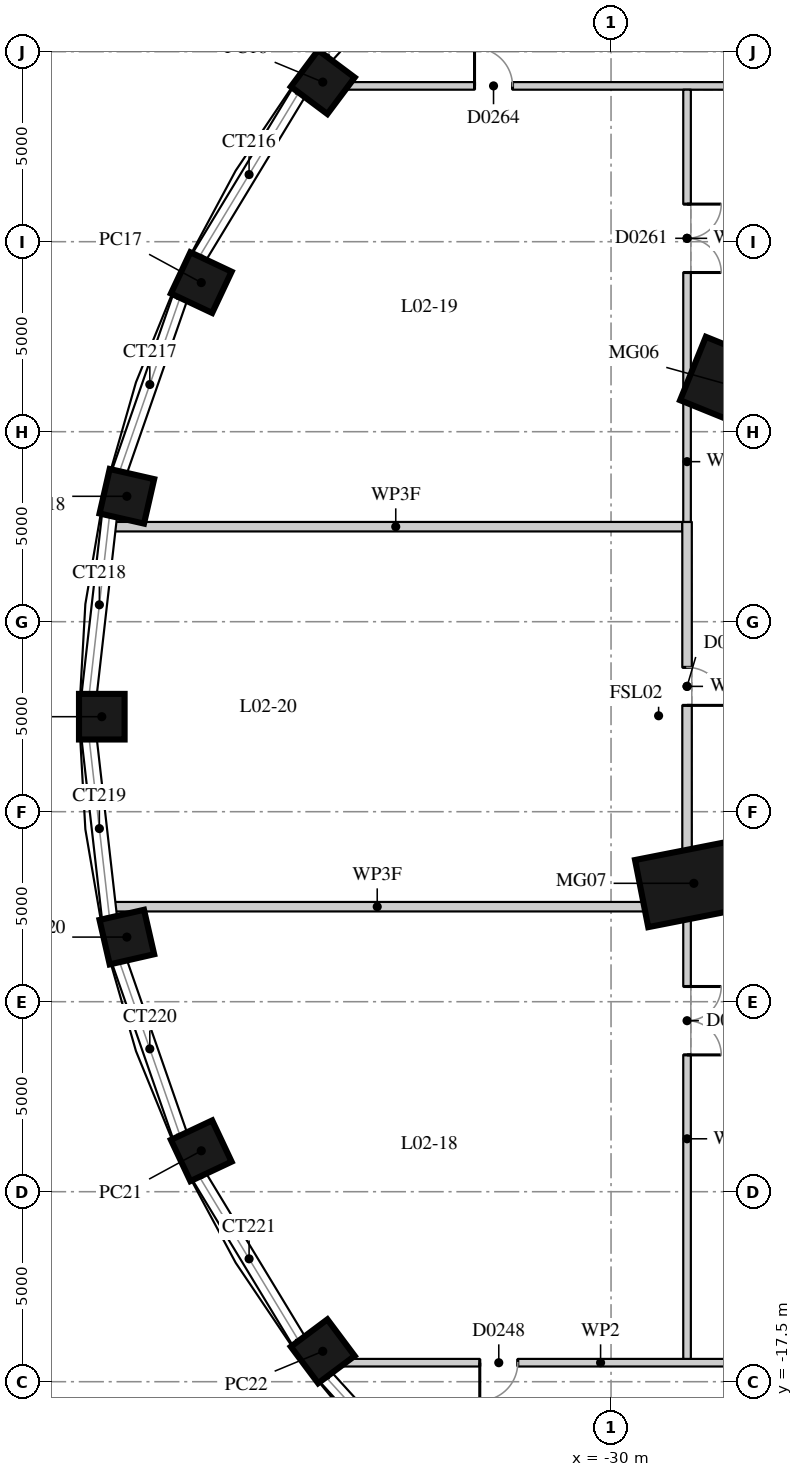
"""IFC4 building model, lengths in metres.
Left out: names, types, materials, properties, quantities, classifications, styles, units other than length and angle.
Written with IfcOpenShell. Run it as: python <this file> out.ifc"""

import sys

from ifc_helpers import new_model, si_unit, direction, frame, frame_2d, origin, origin_2d, place, context, subcontext, project, spatial, rectangle, extrude, element, fill, save


model = new_model("IFC4")
c1 = context("Model", 3, precision=1e-05, world=origin(), true_north=direction((0.0, 1.0)))
c2 = subcontext(c1, "Body", "Model", "MODEL_VIEW")
j1 = project(units=[si_unit("LENGTHUNIT", "METRE"), si_unit("PLANEANGLEUNIT", "RADIAN")], contexts=[c1])
p1 = place(None, origin())
s1 = spatial("IfcSite", under=j1, at=p1, CompositionType="ELEMENT")
p2 = place(p1, origin())
s2 = spatial("IfcBuilding", under=s1, at=p2, CompositionType="ELEMENT")
p3 = place(p2, frame((0.0, 0.0, 12.5)))
s3 = spatial("IfcBuildingStorey", under=s2, at=p3, CompositionType="ELEMENT", Elevation=12.5)
for number, where, z_axis, x_axis in (
    (1, (-26.546, 8.636, 0.0), (0.0, 0.0, 1.0), (-0.927, 0.376, 0.0)),
    (2, (-27.821, -4.385, 0.0), (0.0, 0.0, 1.0), (-0.981, -0.193, 0.0)),
):
    element("IfcColumn", number, at=place(p3, frame(where, z_axis=z_axis, x_axis=x_axis)), inside=s3, PredefinedType="COLUMN", context=c2, shape_type="SweptSolid", body=[
        extrude(rectangle(XDim=2.8, YDim=1.8, at=origin_2d()), origin(), (0.0, 0.0, 1.0), 5.0),
    ])
for number, where, z_axis, x_axis in (
    (3, (-37.585, 16.7, 0.0), (0.0, 0.0, 1.0), (-0.801, 0.599, 0.0)),
    (4, (-40.783, 11.424, 0.0), (0.0, 0.0, 1.0), (-0.905, 0.426, 0.0)),
    (5, (-42.741, 5.8, 0.0), (0.0, 0.0, 1.0), (-0.975, 0.222, 0.0)),
    (6, (-43.4, 0.0, 0.0), (0.0, 0.0, 1.0), (-1.0, 0.0, 0.0)),
    (7, (-42.741, -5.8, 0.0), (0.0, 0.0, 1.0), (-0.975, -0.222, 0.0)),
    (8, (-40.783, -11.424, 0.0), (0.0, 0.0, 1.0), (-0.905, -0.426, 0.0)),
    (9, (-37.585, -16.7, 0.0), (0.0, 0.0, 1.0), (-0.801, -0.599, 0.0)),
):
    element("IfcColumn", number, at=place(p3, frame(where, z_axis=z_axis, x_axis=x_axis)), inside=s3, PredefinedType="COLUMN", context=c2, shape_type="SweptSolid", body=[
        extrude(rectangle(XDim=1.2, YDim=1.2, at=origin_2d()), origin(), (0.0, 0.0, 1.0), 5.0),
    ])
p4 = place(p3, frame((-37.808, -17.0, 0.0), z_axis=(0.0, 0.0, 1.0), x_axis=(1.0, 0.0, 0.0)))
e10 = element("IfcWall", 10, at=p4, inside=s3, PredefinedType="PARTITIONING", context=c2, shape_type="SweptSolid", body=[
    extrude(rectangle(XDim=15.067, YDim=0.2, at=frame_2d((7.533, 0.0))), origin(), (0.0, 0.0, 1.0), 4.65),
])
p5 = place(p4, frame((4.354, 0.0, 0.0)))
e11 = element("IfcOpeningElement", 11, at=p5, cuts=e10, PredefinedType="OPENING", context=c2, shape_type="SweptSolid", body=[
    extrude(rectangle(XDim=1.0, YDim=2.1, at=frame_2d((0.5, 1.05))), frame((0.0, 0.11, 0.0), z_axis=(0.0, -1.0, 0.0), x_axis=(1.0, 0.0, 0.0)), (0.0, 0.0, 1.0), 0.22),
])
p6 = place(p4, frame((13.417, 0.0, 0.0)))
e12 = element("IfcOpeningElement", 12, at=p6, cuts=e10, PredefinedType="OPENING", context=c2, shape_type="SweptSolid", body=[
    extrude(rectangle(XDim=1.0, YDim=2.1, at=frame_2d((0.5, 1.05))), frame((0.0, 0.11, 0.0), z_axis=(0.0, -1.0, 0.0), x_axis=(1.0, 0.0, 0.0)), (0.0, 0.0, 1.0), 0.22),
])
p7 = place(p3, frame((-43.205, -5.0, 0.0), z_axis=(0.0, 0.0, 1.0), x_axis=(1.0, 0.0, 0.0)))
e13 = element("IfcWall", 13, at=p7, inside=s3, PredefinedType="PARTITIONING", context=c2, shape_type="SweptSolid", body=[
    extrude(rectangle(XDim=14.105, YDim=0.25, at=frame_2d((7.052, 0.0))), origin(), (0.0, 0.0, 1.0), 3.65),
])
p8 = place(p3, frame((-43.205, 5.0, 0.0), z_axis=(0.0, 0.0, 1.0), x_axis=(1.0, 0.0, 0.0)))
e14 = element("IfcWall", 14, at=p8, inside=s3, PredefinedType="PARTITIONING", context=c2, shape_type="SweptSolid", body=[
    extrude(rectangle(XDim=15.08, YDim=0.25, at=frame_2d((7.54, 0.0))), origin(), (0.0, 0.0, 1.0), 3.65),
])
p9 = place(p3, frame((-38.084, 16.6, 0.0), z_axis=(0.0, 0.0, 1.0), x_axis=(1.0, 0.0, 0.0)))
e15 = element("IfcWall", 15, at=p9, inside=s3, PredefinedType="PARTITIONING", context=c2, shape_type="SweptSolid", body=[
    extrude(rectangle(XDim=23.685, YDim=0.2, at=frame_2d((11.842, 0.0))), origin(), (0.0, 0.0, 1.0), 4.65),
])
p10 = place(p9, frame((4.492, 0.0, 0.0)))
e16 = element("IfcOpeningElement", 16, at=p10, cuts=e15, PredefinedType="OPENING", context=c2, shape_type="SweptSolid", body=[
    extrude(rectangle(XDim=1.0, YDim=2.1, at=frame_2d((0.5, 1.05))), frame((0.0, 0.11, 0.0), z_axis=(0.0, -1.0, 0.0), x_axis=(1.0, 0.0, 0.0)), (0.0, 0.0, 1.0), 0.22),
])
p11 = place(p9, frame((15.584, 0.0, 0.0)))
e17 = element("IfcOpeningElement", 17, at=p11, cuts=e15, PredefinedType="OPENING", context=c2, shape_type="SweptSolid", body=[
    extrude(rectangle(XDim=1.0, YDim=2.1, at=frame_2d((0.5, 1.05))), frame((0.0, 0.11, 0.0), z_axis=(0.0, -1.0, 0.0), x_axis=(1.0, 0.0, 0.0)), (0.0, 0.0, 1.0), 0.22),
])
p12 = place(p3, frame((-28.0, -16.9, 0.0), z_axis=(0.0, 0.0, 1.0), x_axis=(0.0, 1.0, 0.0)))
e18 = element("IfcWall", 18, at=p12, inside=s3, PredefinedType="PARTITIONING", context=c2, shape_type="SweptSolid", body=[
    extrude(rectangle(XDim=11.584, YDim=0.2, at=frame_2d((5.792, 0.0))), origin(), (0.0, 0.0, 1.0), 4.65),
])
p13 = place(p12, frame((8.0, 0.0, 0.0)))
e19 = element("IfcOpeningElement", 19, at=p13, cuts=e18, PredefinedType="OPENING", context=c2, shape_type="SweptSolid", body=[
    extrude(rectangle(XDim=1.8, YDim=2.1, at=frame_2d((0.9, 1.05))), frame((0.0, 0.11, 0.0), z_axis=(0.0, -1.0, 0.0), x_axis=(1.0, 0.0, 0.0)), (0.0, 0.0, 1.0), 0.22),
])
p14 = place(p3, frame((-28.0, -3.529, 0.0), z_axis=(0.0, 0.0, 1.0), x_axis=(0.0, 1.0, 0.0)))
e20 = element("IfcWall", 20, at=p14, inside=s3, PredefinedType="PARTITIONING", context=c2, shape_type="SweptSolid", body=[
    extrude(rectangle(XDim=8.654, YDim=0.25, at=frame_2d((4.327, 0.0))), origin(), (0.0, 0.0, 1.0), 2.65),
])
p15 = place(p14, frame((3.827, 0.0, 0.0)))
e21 = element("IfcOpeningElement", 21, at=p15, cuts=e20, PredefinedType="OPENING", context=c2, shape_type="SweptSolid", body=[
    extrude(rectangle(XDim=1.0, YDim=2.1, at=frame_2d((0.5, 1.05))), frame((0.0, 0.135, 0.0), z_axis=(0.0, -1.0, 0.0), x_axis=(1.0, 0.0, 0.0)), (0.0, 0.0, 1.0), 0.27),
])
p16 = place(p3, frame((-28.0, 5.125, 0.0), z_axis=(0.0, 0.0, 1.0), x_axis=(0.0, 1.0, 0.0)))
e22 = element("IfcWall", 22, at=p16, inside=s3, PredefinedType="PARTITIONING", context=c2, shape_type="SweptSolid", body=[
    extrude(rectangle(XDim=3.173, YDim=0.2, at=frame_2d((1.586, 0.0))), origin(), (0.0, 0.0, 1.0), 2.65),
])
p17 = place(p3, frame((-28.0, 8.677, 0.0), z_axis=(0.0, 0.0, 1.0), x_axis=(0.0, 1.0, 0.0)))
e23 = element("IfcWall", 23, at=p17, inside=s3, PredefinedType="PARTITIONING", context=c2, shape_type="SweptSolid", body=[
    extrude(rectangle(XDim=7.823, YDim=0.2, at=frame_2d((3.912, 0.0))), origin(), (0.0, 0.0, 1.0), 4.65),
])
p18 = place(p17, frame((3.012, 0.0, 0.0)))
e24 = element("IfcOpeningElement", 24, at=p18, cuts=e23, PredefinedType="OPENING", context=c2, shape_type="SweptSolid", body=[
    extrude(rectangle(XDim=1.8, YDim=2.1, at=frame_2d((0.9, 1.05))), frame((0.0, 0.11, 0.0), z_axis=(0.0, -1.0, 0.0), x_axis=(1.0, 0.0, 0.0)), (0.0, 0.0, 1.0), 0.22),
])
p19 = place(p13, origin())
e25 = element("IfcDoor", 25, at=p19, inside=s3, OperationType="DOUBLE_DOOR_SINGLE_SWING", PredefinedType="DOOR", context=c2, shape_type="SweptSolid", body=[
    extrude(rectangle(XDim=1.8, YDim=2.1, at=frame_2d((0.9, 1.05))), frame((0.0, 0.025, 0.0), z_axis=(0.0, -1.0, 0.0), x_axis=(1.0, 0.0, 0.0)), (0.0, 0.0, 1.0), 0.05),
])
fill(e19, e25)
p20 = place(p5, origin())
e26 = element("IfcDoor", 26, at=p20, inside=s3, OperationType="SINGLE_SWING_RIGHT", PredefinedType="DOOR", context=c2, shape_type="SweptSolid", body=[
    extrude(rectangle(XDim=1.0, YDim=2.1, at=frame_2d((0.5, 1.05))), frame((0.0, 0.025, 0.0), z_axis=(0.0, -1.0, 0.0), x_axis=(1.0, 0.0, 0.0)), (0.0, 0.0, 1.0), 0.05),
])
fill(e11, e26)
p21 = place(p18, origin())
e27 = element("IfcDoor", 27, at=p21, inside=s3, OperationType="DOUBLE_DOOR_SINGLE_SWING", PredefinedType="DOOR", context=c2, shape_type="SweptSolid", body=[
    extrude(rectangle(XDim=1.8, YDim=2.1, at=frame_2d((0.9, 1.05))), frame((0.0, 0.025, 0.0), z_axis=(0.0, -1.0, 0.0), x_axis=(1.0, 0.0, 0.0)), (0.0, 0.0, 1.0), 0.05),
])
fill(e24, e27)
p22 = place(p15, origin())
e28 = element("IfcDoor", 28, at=p22, inside=s3, OperationType="SINGLE_SWING_RIGHT", PredefinedType="DOOR", context=c2, shape_type="SweptSolid", body=[
    extrude(rectangle(XDim=1.0, YDim=2.1, at=frame_2d((0.5, 1.05))), frame((0.0, 0.025, 0.0), z_axis=(0.0, -1.0, 0.0), x_axis=(1.0, 0.0, 0.0)), (0.0, 0.0, 1.0), 0.05),
])
fill(e21, e28)
p23 = place(p10, origin())
e29 = element("IfcDoor", 29, at=p23, inside=s3, OperationType="SINGLE_SWING_LEFT", PredefinedType="DOOR", context=c2, shape_type="SweptSolid", body=[
    extrude(rectangle(XDim=1.0, YDim=2.1, at=frame_2d((0.5, 1.05))), frame((0.0, 0.025, 0.0), z_axis=(0.0, -1.0, 0.0), x_axis=(1.0, 0.0, 0.0)), (0.0, 0.0, 1.0), 0.05),
])
fill(e16, e29)
save(model, sys.argv[1])
